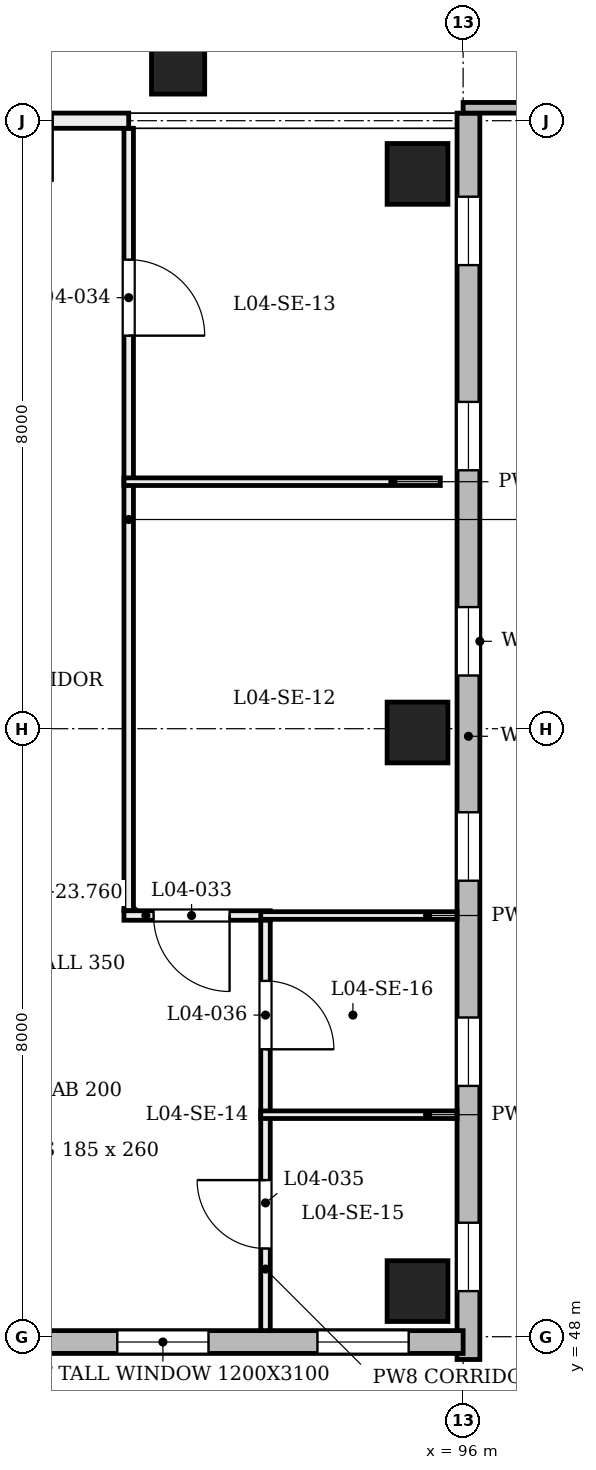
"""IFC4 building model, lengths in metres.
Left out: names, types, materials, properties, quantities, classifications, styles, units other than length and angle.
Written with IfcOpenShell. Run it as: python <this file> out.ifc"""

import sys

from ifc_helpers import new_model, si_unit, direction, frame, frame_2d, origin, origin_2d, place, context, subcontext, project, spatial, rectangle, extrude, element, fill, save


model = new_model("IFC4")
c1 = context("Model", 3, precision=1e-05, world=origin(), true_north=direction((0.0, 1.0)))
c2 = subcontext(c1, "Body", "Model", "MODEL_VIEW")
j1 = project(units=[si_unit("LENGTHUNIT", "METRE"), si_unit("PLANEANGLEUNIT", "RADIAN")], contexts=[c1])
p1 = place(None, origin())
s1 = spatial("IfcSite", under=j1, at=p1, CompositionType="ELEMENT")
p2 = place(p1, origin())
s2 = spatial("IfcBuilding", under=s1, at=p2, CompositionType="ELEMENT")
p3 = place(p2, frame((0.0, 0.0, 19.2)))
s3 = spatial("IfcBuildingStorey", under=s2, at=p3, CompositionType="ELEMENT", Elevation=19.2)
for number, where, z_axis, x_axis in (
    (1, (95.4, 48.6, 0.0), (0.0, 0.0, 1.0), (1.0, 0.0, 0.0)),
    (2, (95.4, 55.95, 0.0), (0.0, 0.0, 1.0), (1.0, 0.0, 0.0)),
    (3, (95.4, 63.3, 0.0), (0.0, 0.0, 1.0), (1.0, 0.0, 0.0)),
):
    element("IfcColumn", number, at=place(p3, frame(where, z_axis=z_axis, x_axis=x_axis)), inside=s3, PredefinedType="COLUMN", context=c2, shape_type="SweptSolid", body=[
        extrude(rectangle(XDim=0.8, YDim=0.8, at=origin_2d()), origin(), (0.0, 0.0, 1.0), 4.8),
    ])
p4 = place(p3, frame((92.0, 64.7, 0.0), z_axis=(0.203937582782, 0.0, 0.978983892783), x_axis=(0.0, 1.0, 0.0)))
e4 = element("IfcColumn", 4, at=p4, inside=s3, PredefinedType="COLUMN", context=c2, shape_type="SweptSolid", body=[
    extrude(rectangle(XDim=0.7, YDim=0.7, at=origin_2d()), origin(), (0.0, 0.0, 1.0), 4.678),
])
p5 = place(p3, frame((96.07, 47.7, 0.0), z_axis=(0.0, 0.0, 1.0), x_axis=(0.0, 1.0, 0.0)))
e5 = element("IfcWall", 5, at=p5, inside=s3, PredefinedType="SOLIDWALL", context=c2, shape_type="SweptSolid", body=[
    extrude(rectangle(XDim=16.4, YDim=0.3, at=frame_2d((8.2, 0.0))), origin(), (0.0, 0.0, 1.0), 3.9),
])
p6 = place(p5, frame((0.9, 0.0, 0.75)))
e6 = element("IfcOpeningElement", 6, at=p6, cuts=e5, PredefinedType="OPENING", context=c2, shape_type="SweptSolid", body=[
    extrude(rectangle(XDim=0.9, YDim=3.1, at=frame_2d((0.45, 1.55))), frame((0.0, 0.16, 0.0), z_axis=(0.0, -1.0, 0.0), x_axis=(1.0, 0.0, 0.0)), (0.0, 0.0, 1.0), 0.32),
])
p7 = place(p5, frame((3.6, 0.0, 0.75)))
e7 = element("IfcOpeningElement", 7, at=p7, cuts=e5, PredefinedType="OPENING", context=c2, shape_type="SweptSolid", body=[
    extrude(rectangle(XDim=0.9, YDim=3.1, at=frame_2d((0.45, 1.55))), frame((0.0, 0.16, 0.0), z_axis=(0.0, -1.0, 0.0), x_axis=(1.0, 0.0, 0.0)), (0.0, 0.0, 1.0), 0.32),
])
p8 = place(p5, frame((6.3, 0.0, 0.75)))
e8 = element("IfcOpeningElement", 8, at=p8, cuts=e5, PredefinedType="OPENING", context=c2, shape_type="SweptSolid", body=[
    extrude(rectangle(XDim=0.9, YDim=3.1, at=frame_2d((0.45, 1.55))), frame((0.0, 0.16, 0.0), z_axis=(0.0, -1.0, 0.0), x_axis=(1.0, 0.0, 0.0)), (0.0, 0.0, 1.0), 0.32),
])
p9 = place(p5, frame((9.0, 0.0, 0.75)))
e9 = element("IfcOpeningElement", 9, at=p9, cuts=e5, PredefinedType="OPENING", context=c2, shape_type="SweptSolid", body=[
    extrude(rectangle(XDim=0.9, YDim=3.1, at=frame_2d((0.45, 1.55))), frame((0.0, 0.16, 0.0), z_axis=(0.0, -1.0, 0.0), x_axis=(1.0, 0.0, 0.0)), (0.0, 0.0, 1.0), 0.32),
])
p10 = place(p5, frame((11.7, 0.0, 0.75)))
e10 = element("IfcOpeningElement", 10, at=p10, cuts=e5, PredefinedType="OPENING", context=c2, shape_type="SweptSolid", body=[
    extrude(rectangle(XDim=0.9, YDim=3.1, at=frame_2d((0.45, 1.55))), frame((0.0, 0.16, 0.0), z_axis=(0.0, -1.0, 0.0), x_axis=(1.0, 0.0, 0.0)), (0.0, 0.0, 1.0), 0.32),
])
p11 = place(p5, frame((14.4, 0.0, 0.75)))
e11 = element("IfcOpeningElement", 11, at=p11, cuts=e5, PredefinedType="OPENING", context=c2, shape_type="SweptSolid", body=[
    extrude(rectangle(XDim=0.9, YDim=3.1, at=frame_2d((0.45, 1.55))), frame((0.0, 0.16, 0.0), z_axis=(0.0, -1.0, 0.0), x_axis=(1.0, 0.0, 0.0)), (0.0, 0.0, 1.0), 0.32),
])
p12 = place(p3, frame((88.1, 47.93, 0.0), z_axis=(0.0, 0.0, 1.0), x_axis=(1.0, 0.0, 0.0)))
e12 = element("IfcWall", 12, at=p12, inside=s3, PredefinedType="SOLIDWALL", context=c2, shape_type="SweptSolid", body=[
    extrude(rectangle(XDim=7.9, YDim=0.3, at=frame_2d((3.95, 0.0))), origin(), (0.0, 0.0, 1.0), 3.9),
])
p13 = place(p12, frame((0.717, 0.0, 0.75)))
e13 = element("IfcOpeningElement", 13, at=p13, cuts=e12, PredefinedType="OPENING", context=c2, shape_type="SweptSolid", body=[
    extrude(rectangle(XDim=1.2, YDim=3.1, at=frame_2d((0.6, 1.55))), frame((0.0, 0.16, 0.0), z_axis=(0.0, -1.0, 0.0), x_axis=(1.0, 0.0, 0.0)), (0.0, 0.0, 1.0), 0.32),
])
p14 = place(p12, frame((3.35, 0.0, 0.75)))
e14 = element("IfcOpeningElement", 14, at=p14, cuts=e12, PredefinedType="OPENING", context=c2, shape_type="SweptSolid", body=[
    extrude(rectangle(XDim=1.2, YDim=3.1, at=frame_2d((0.6, 1.55))), frame((0.0, 0.16, 0.0), z_axis=(0.0, -1.0, 0.0), x_axis=(1.0, 0.0, 0.0)), (0.0, 0.0, 1.0), 0.32),
])
p15 = place(p12, frame((5.983, 0.0, 0.75)))
e15 = element("IfcOpeningElement", 15, at=p15, cuts=e12, PredefinedType="OPENING", context=c2, shape_type="SweptSolid", body=[
    extrude(rectangle(XDim=1.2, YDim=3.1, at=frame_2d((0.6, 1.55))), frame((0.0, 0.16, 0.0), z_axis=(0.0, -1.0, 0.0), x_axis=(1.0, 0.0, 0.0)), (0.0, 0.0, 1.0), 0.32),
])
p16 = place(p3, frame((96.0, 64.17, 0.0), z_axis=(0.0, 0.0, 1.0), x_axis=(1.0, 0.0, 0.0)))
e16 = element("IfcWall", 16, at=p16, inside=s3, PredefinedType="SOLIDWALL", context=c2, shape_type="SweptSolid", body=[
    extrude(rectangle(XDim=4.0, YDim=0.14, at=frame_2d((2.0, 0.0))), origin(), (0.0, 0.0, 1.0), 3.9),
])
p17 = place(p3, frame((91.6, 53.605, 0.0), z_axis=(0.0, 0.0, 1.0), x_axis=(0.0, 1.0, 0.0)))
e17 = element("IfcWall", 17, at=p17, inside=s3, PredefinedType="PARTITIONING", context=c2, shape_type="SweptSolid", body=[
    extrude(rectangle(XDim=10.295, YDim=0.125, at=frame_2d((5.147, 0.0))), origin(), (0.0, 0.0, 1.0), 3.88),
])
p18 = place(p17, frame((7.567, 0.0, 0.0)))
e18 = element("IfcOpeningElement", 18, at=p18, cuts=e17, PredefinedType="OPENING", context=c2, shape_type="SweptSolid", body=[
    extrude(rectangle(XDim=1.0, YDim=2.1, at=frame_2d((0.5, 1.05))), frame((0.0, 0.073, 0.0), z_axis=(0.0, -1.0, 0.0), x_axis=(1.0, 0.0, 0.0)), (0.0, 0.0, 1.0), 0.145),
])
p19 = place(p3, frame((91.538, 53.542, 0.0), z_axis=(0.0, 0.0, 1.0), x_axis=(1.0, 0.0, 0.0)))
e19 = element("IfcWall", 19, at=p19, inside=s3, PredefinedType="PARTITIONING", context=c2, shape_type="SweptSolid", body=[
    extrude(rectangle(XDim=1.925, YDim=0.125, at=frame_2d((0.962, 0.0))), origin(), (0.0, 0.0, 1.0), 4.56),
])
p20 = place(p19, frame((0.39, 0.0, 0.0)))
e20 = element("IfcOpeningElement", 20, at=p20, cuts=e19, PredefinedType="OPENING", context=c2, shape_type="SweptSolid", body=[
    extrude(rectangle(XDim=1.0, YDim=2.1, at=frame_2d((0.5, 1.05))), frame((0.0, 0.073, 0.0), z_axis=(0.0, -1.0, 0.0), x_axis=(1.0, 0.0, 0.0)), (0.0, 0.0, 1.0), 0.145),
])
p21 = place(p3, frame((93.337, 53.542, 0.0), z_axis=(0.0, 0.0, 1.0), x_axis=(1.0, 0.0, 0.0)))
e21 = element("IfcWall", 21, at=p21, inside=s3, PredefinedType="PARTITIONING", context=c2, shape_type="SweptSolid", body=[
    extrude(rectangle(XDim=2.583, YDim=0.1, at=frame_2d((1.291, 0.0))), origin(), (0.0, 0.0, 1.0), 3.88),
])
p22 = place(p3, frame((91.538, 59.25, 0.0), z_axis=(0.0, 0.0, 1.0), x_axis=(1.0, 0.0, 0.0)))
e22 = element("IfcWall", 22, at=p22, inside=s3, PredefinedType="PARTITIONING", context=c2, shape_type="SweptSolid", body=[
    extrude(rectangle(XDim=4.162, YDim=0.1, at=frame_2d((2.081, 0.0))), origin(), (0.0, 0.0, 1.0), 3.98),
])
p23 = place(p3, frame((93.4, 48.08, 0.0), z_axis=(0.0, 0.0, 1.0), x_axis=(0.0, 1.0, 0.0)))
e23 = element("IfcWall", 23, at=p23, inside=s3, PredefinedType="PARTITIONING", context=c2, shape_type="SweptSolid", body=[
    extrude(rectangle(XDim=5.4, YDim=0.125, at=frame_2d((2.7, 0.0))), origin(), (0.0, 0.0, 1.0), 3.88),
])
p24 = place(p23, frame((1.081, 0.0, 0.0)))
e24 = element("IfcOpeningElement", 24, at=p24, cuts=e23, PredefinedType="OPENING", context=c2, shape_type="SweptSolid", body=[
    extrude(rectangle(XDim=0.9, YDim=2.1, at=frame_2d((0.45, 1.05))), frame((0.0, 0.073, 0.0), z_axis=(0.0, -1.0, 0.0), x_axis=(1.0, 0.0, 0.0)), (0.0, 0.0, 1.0), 0.145),
])
p25 = place(p23, frame((3.702, 0.0, 0.0)))
e25 = element("IfcOpeningElement", 25, at=p25, cuts=e23, PredefinedType="OPENING", context=c2, shape_type="SweptSolid", body=[
    extrude(rectangle(XDim=0.9, YDim=2.1, at=frame_2d((0.45, 1.05))), frame((0.0, 0.073, 0.0), z_axis=(0.0, -1.0, 0.0), x_axis=(1.0, 0.0, 0.0)), (0.0, 0.0, 1.0), 0.145),
])
p26 = place(p3, frame((93.337, 50.921, 0.0), z_axis=(0.0, 0.0, 1.0), x_axis=(1.0, 0.0, 0.0)))
e26 = element("IfcWall", 26, at=p26, inside=s3, PredefinedType="PARTITIONING", context=c2, shape_type="SweptSolid", body=[
    extrude(rectangle(XDim=2.583, YDim=0.1, at=frame_2d((1.291, 0.0))), origin(), (0.0, 0.0, 1.0), 3.88),
])
p27 = place(p3, frame((88.0, 64.0, 0.0), z_axis=(0.0, 0.0, 1.0), x_axis=(1.0, 0.0, 0.0)))
e27 = element("IfcWall", 27, at=p27, inside=s3, PredefinedType="PARTITIONING", context=c2, shape_type="SweptSolid", body=[
    extrude(rectangle(XDim=3.6, YDim=0.2, at=frame_2d((1.8, 0.0))), origin(), (0.0, 0.0, 1.0), 3.88),
])
p28 = place(p27, frame((1.0, 0.0, 0.0)))
e28 = element("IfcOpeningElement", 28, at=p28, cuts=e27, PredefinedType="OPENING", context=c2, shape_type="SweptSolid", body=[
    extrude(rectangle(XDim=1.6, YDim=2.1, at=frame_2d((0.8, 1.05))), frame((0.0, 0.11, 0.0), z_axis=(0.0, -1.0, 0.0), x_axis=(1.0, 0.0, 0.0)), (0.0, 0.0, 1.0), 0.22),
])
p29 = place(p6, origin())
e29 = element("IfcWindow", 29, at=p29, inside=s3, PartitioningType="SINGLE_PANEL", PredefinedType="WINDOW", context=c2, shape_type="SweptSolid", body=[
    extrude(rectangle(XDim=0.9, YDim=3.1, at=frame_2d((0.45, 1.55))), frame((0.0, 0.03, 0.0), z_axis=(0.0, -1.0, 0.0), x_axis=(1.0, 0.0, 0.0)), (0.0, 0.0, 1.0), 0.06),
])
fill(e6, e29)
p30 = place(p7, origin())
e30 = element("IfcWindow", 30, at=p30, inside=s3, PartitioningType="SINGLE_PANEL", PredefinedType="WINDOW", context=c2, shape_type="SweptSolid", body=[
    extrude(rectangle(XDim=0.9, YDim=3.1, at=frame_2d((0.45, 1.55))), frame((0.0, 0.03, 0.0), z_axis=(0.0, -1.0, 0.0), x_axis=(1.0, 0.0, 0.0)), (0.0, 0.0, 1.0), 0.06),
])
fill(e7, e30)
p31 = place(p8, origin())
e31 = element("IfcWindow", 31, at=p31, inside=s3, PartitioningType="SINGLE_PANEL", PredefinedType="WINDOW", context=c2, shape_type="SweptSolid", body=[
    extrude(rectangle(XDim=0.9, YDim=3.1, at=frame_2d((0.45, 1.55))), frame((0.0, 0.03, 0.0), z_axis=(0.0, -1.0, 0.0), x_axis=(1.0, 0.0, 0.0)), (0.0, 0.0, 1.0), 0.06),
])
fill(e8, e31)
p32 = place(p9, origin())
e32 = element("IfcWindow", 32, at=p32, inside=s3, PartitioningType="SINGLE_PANEL", PredefinedType="WINDOW", context=c2, shape_type="SweptSolid", body=[
    extrude(rectangle(XDim=0.9, YDim=3.1, at=frame_2d((0.45, 1.55))), frame((0.0, 0.03, 0.0), z_axis=(0.0, -1.0, 0.0), x_axis=(1.0, 0.0, 0.0)), (0.0, 0.0, 1.0), 0.06),
])
fill(e9, e32)
p33 = place(p10, origin())
e33 = element("IfcWindow", 33, at=p33, inside=s3, PartitioningType="SINGLE_PANEL", PredefinedType="WINDOW", context=c2, shape_type="SweptSolid", body=[
    extrude(rectangle(XDim=0.9, YDim=3.1, at=frame_2d((0.45, 1.55))), frame((0.0, 0.03, 0.0), z_axis=(0.0, -1.0, 0.0), x_axis=(1.0, 0.0, 0.0)), (0.0, 0.0, 1.0), 0.06),
])
fill(e10, e33)
p34 = place(p11, origin())
e34 = element("IfcWindow", 34, at=p34, inside=s3, PartitioningType="SINGLE_PANEL", PredefinedType="WINDOW", context=c2, shape_type="SweptSolid", body=[
    extrude(rectangle(XDim=0.9, YDim=3.1, at=frame_2d((0.45, 1.55))), frame((0.0, 0.03, 0.0), z_axis=(0.0, -1.0, 0.0), x_axis=(1.0, 0.0, 0.0)), (0.0, 0.0, 1.0), 0.06),
])
fill(e11, e34)
p35 = place(p14, origin())
e35 = element("IfcWindow", 35, at=p35, inside=s3, PartitioningType="SINGLE_PANEL", PredefinedType="WINDOW", context=c2, shape_type="SweptSolid", body=[
    extrude(rectangle(XDim=1.2, YDim=3.1, at=frame_2d((0.6, 1.55))), frame((0.0, 0.03, 0.0), z_axis=(0.0, -1.0, 0.0), x_axis=(1.0, 0.0, 0.0)), (0.0, 0.0, 1.0), 0.06),
])
fill(e14, e35)
p36 = place(p15, origin())
e36 = element("IfcWindow", 36, at=p36, inside=s3, PartitioningType="SINGLE_PANEL", PredefinedType="WINDOW", context=c2, shape_type="SweptSolid", body=[
    extrude(rectangle(XDim=1.2, YDim=3.1, at=frame_2d((0.6, 1.55))), frame((0.0, 0.03, 0.0), z_axis=(0.0, -1.0, 0.0), x_axis=(1.0, 0.0, 0.0)), (0.0, 0.0, 1.0), 0.06),
])
fill(e15, e36)
p37 = place(p20, origin())
e37 = element("IfcDoor", 37, at=p37, inside=s3, OperationType="SINGLE_SWING_RIGHT", PredefinedType="DOOR", context=c2, shape_type="SweptSolid", body=[
    extrude(rectangle(XDim=1.0, YDim=2.1, at=frame_2d((0.5, 1.05))), frame((0.0, 0.025, 0.0), z_axis=(0.0, -1.0, 0.0), x_axis=(1.0, 0.0, 0.0)), (0.0, 0.0, 1.0), 0.05),
])
fill(e20, e37)
p38 = place(p18, frame((1.0, 0.0, 0.0), z_axis=(0.0, 0.0, 1.0), x_axis=(-1.0, 0.0, 0.0)))
e38 = element("IfcDoor", 38, at=p38, inside=s3, OperationType="SINGLE_SWING_LEFT", PredefinedType="DOOR", context=c2, shape_type="SweptSolid", body=[
    extrude(rectangle(XDim=1.0, YDim=2.1, at=frame_2d((0.5, 1.05))), frame((0.0, 0.025, 0.0), z_axis=(0.0, -1.0, 0.0), x_axis=(1.0, 0.0, 0.0)), (0.0, 0.0, 1.0), 0.05),
])
fill(e18, e38)
p39 = place(p24, frame((0.9, 0.0, 0.0), z_axis=(0.0, 0.0, 1.0), x_axis=(-1.0, 0.0, 0.0)))
e39 = element("IfcDoor", 39, at=p39, inside=s3, OperationType="SINGLE_SWING_RIGHT", PredefinedType="DOOR", context=c2, shape_type="SweptSolid", body=[
    extrude(rectangle(XDim=0.9, YDim=2.1, at=frame_2d((0.45, 1.05))), frame((0.0, 0.025, 0.0), z_axis=(0.0, -1.0, 0.0), x_axis=(1.0, 0.0, 0.0)), (0.0, 0.0, 1.0), 0.05),
])
fill(e24, e39)
p40 = place(p25, frame((0.9, 0.0, 0.0), z_axis=(0.0, 0.0, 1.0), x_axis=(-1.0, 0.0, 0.0)))
e40 = element("IfcDoor", 40, at=p40, inside=s3, OperationType="SINGLE_SWING_LEFT", PredefinedType="DOOR", context=c2, shape_type="SweptSolid", body=[
    extrude(rectangle(XDim=0.9, YDim=2.1, at=frame_2d((0.45, 1.05))), frame((0.0, 0.025, 0.0), z_axis=(0.0, -1.0, 0.0), x_axis=(1.0, 0.0, 0.0)), (0.0, 0.0, 1.0), 0.05),
])
fill(e25, e40)
save(model, sys.argv[1])
